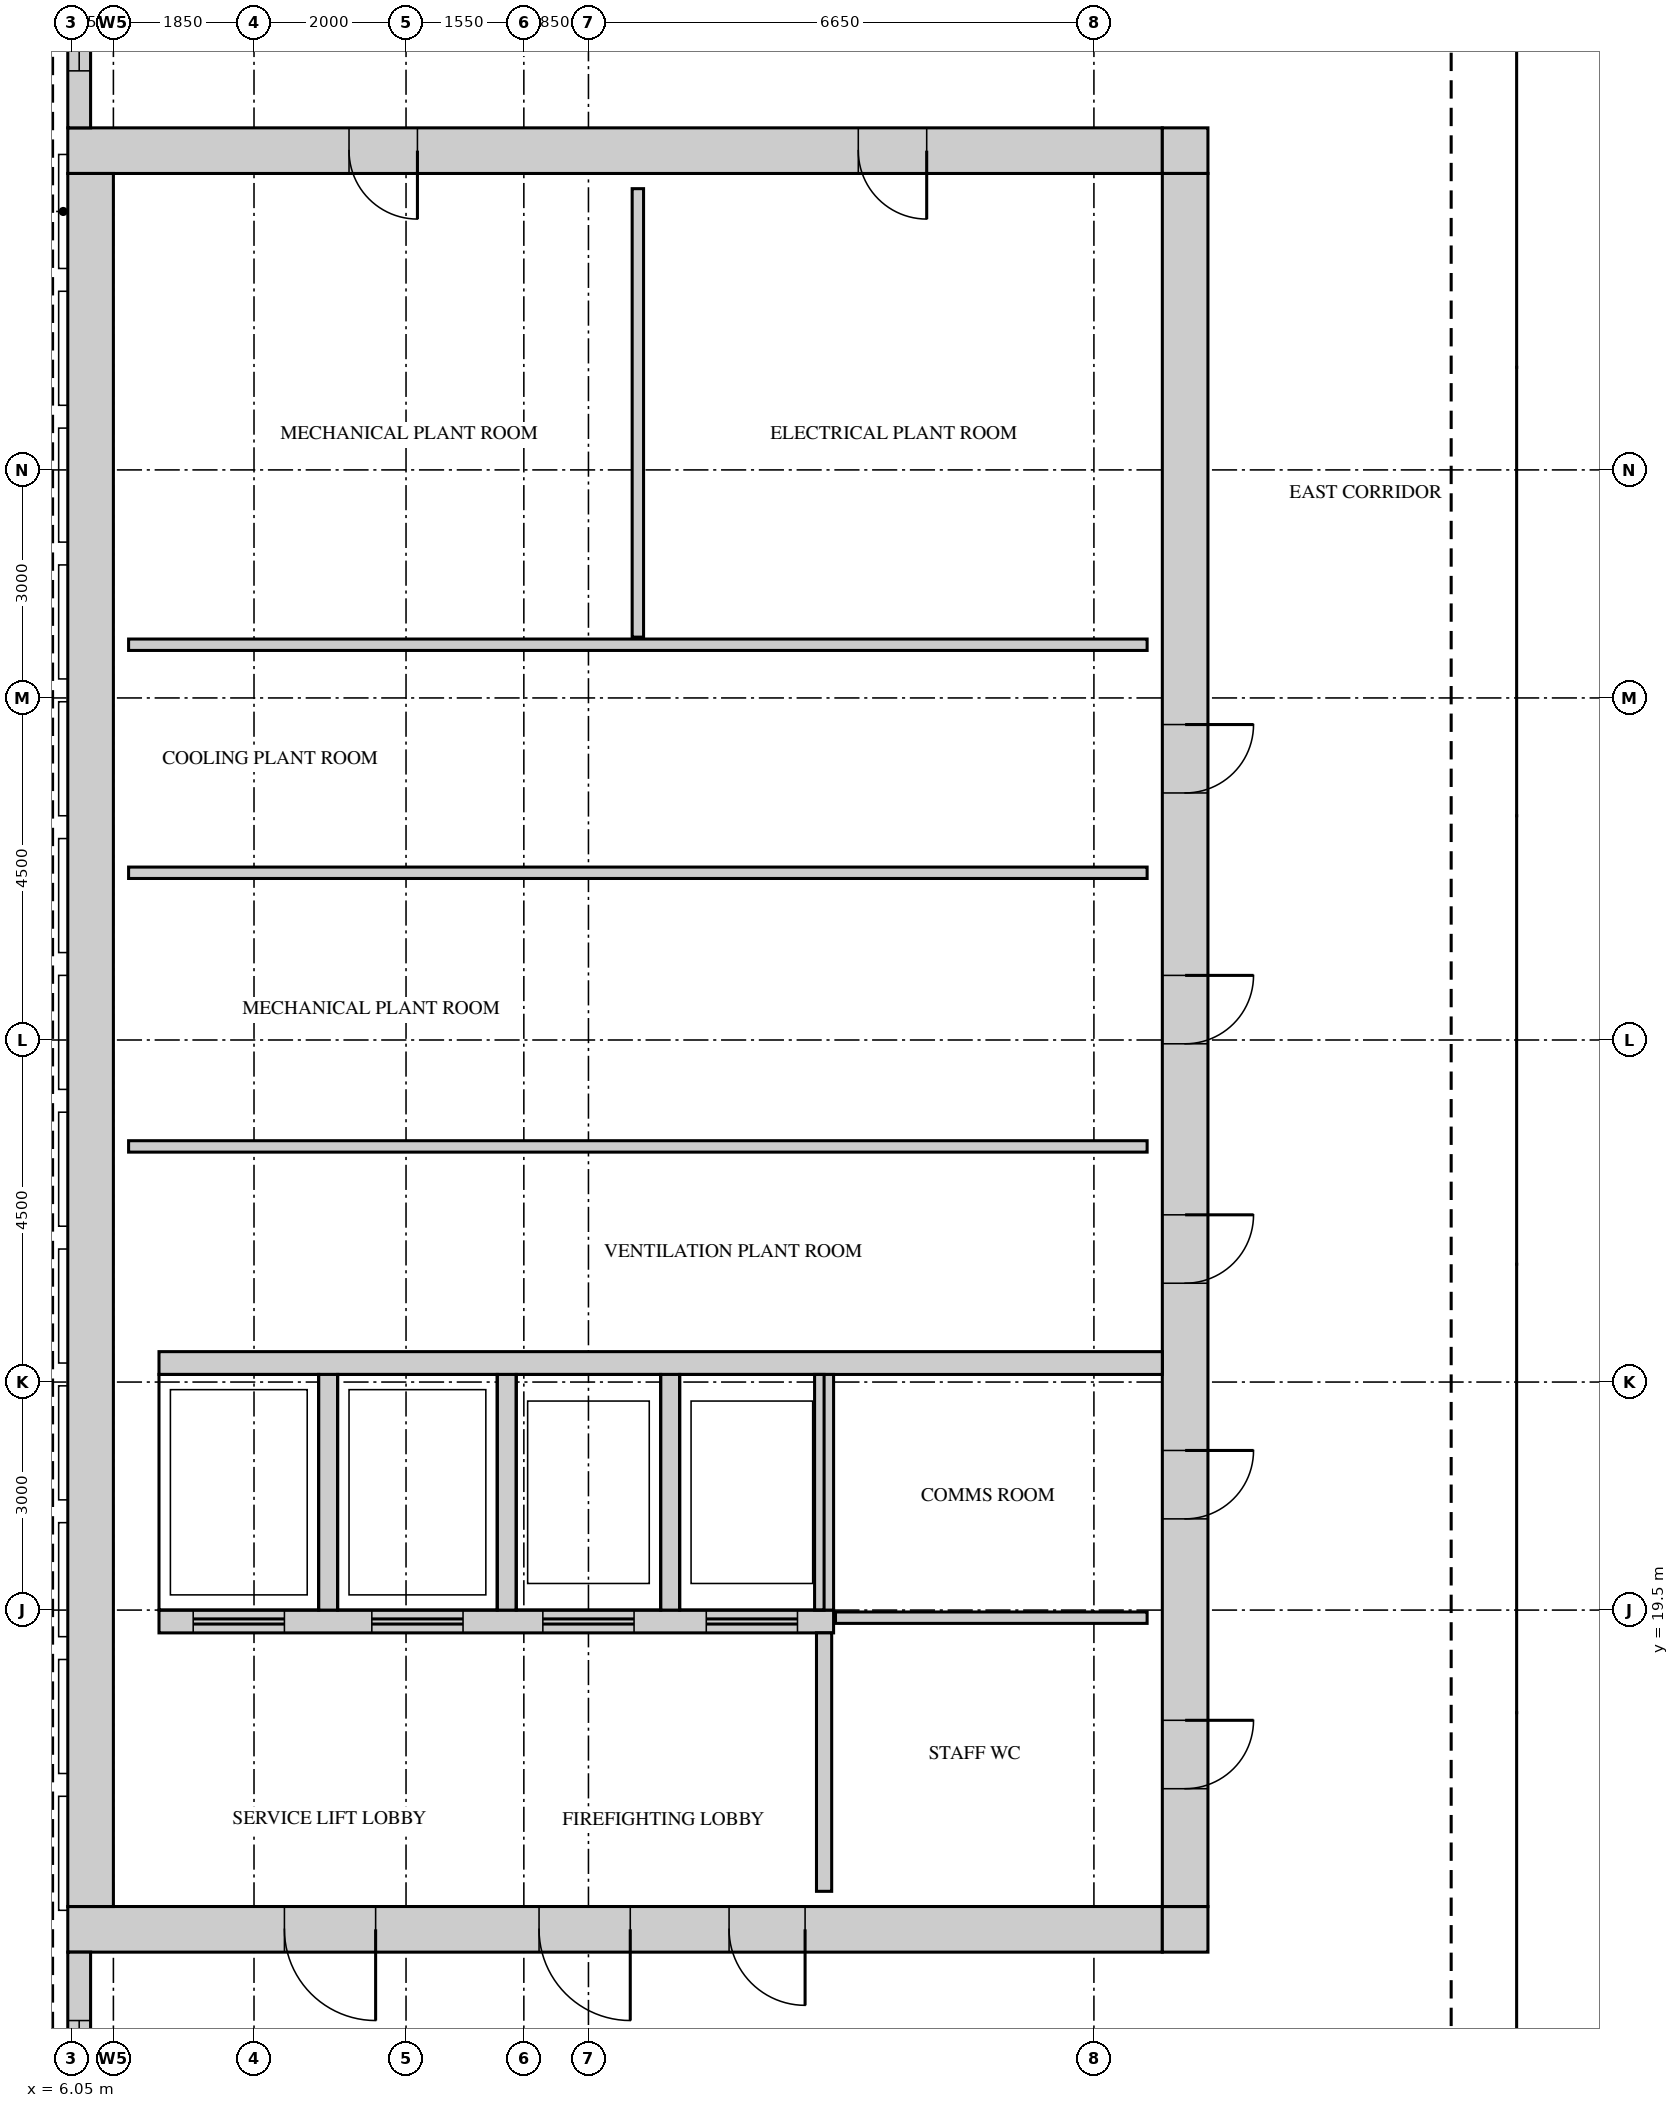
"""IFC4 building model, lengths in metres.
Left out: names, types, materials, properties, quantities, classifications, styles, units other than length and angle.
Written with IfcOpenShell. Run it as: python <this file> out.ifc"""

import sys

from ifc_helpers import new_model, si_unit, direction, frame, frame_2d, origin, place, context, subcontext, project, spatial, rectangle, extrude, source, transform, mapped, element, fill, save


model = new_model("IFC4")
c1 = context("Model", 3, precision=1e-05, world=origin(), true_north=direction((0.0, 1.0)))
c2 = subcontext(c1, "Body", "Model", "MODEL_VIEW")
j1 = project(units=[si_unit("LENGTHUNIT", "METRE"), si_unit("PLANEANGLEUNIT", "RADIAN")], contexts=[c1])
p1 = place(None, origin())
s1 = spatial("IfcSite", under=j1, at=p1, CompositionType="ELEMENT")
p2 = place(p1, origin())
s2 = spatial("IfcBuilding", under=s1, at=p2, CompositionType="ELEMENT")
p3 = place(p2, frame((0.0, 0.0, 352.7)))
s3 = spatial("IfcBuildingStorey", under=s2, at=p3, CompositionType="ELEMENT", Elevation=352.7)
m1 = source(origin(), c2, "Body", "SweptSolid", [
    extrude(rectangle(XDim=14.4, YDim=0.6, at=frame_2d((7.2, 0.0))), origin(), (0.0, 0.0, 1.0), 4.5),
])
p4 = place(p3, frame((6.0, 38.7, 0.0), z_axis=(0.0, 0.0, 1.0), x_axis=(1.0, 0.0, 0.0)))
e1 = element("IfcWall", 1, at=p4, inside=s3, PredefinedType="SHEAR", context=c2, shape_type="MappedRepresentation", body=[
    mapped(m1, transform((0.0, 0.0, 0.0))),
])
m2 = source(origin(), c2, "Body", "SweptSolid", [
    extrude(rectangle(XDim=0.9, YDim=2.1, at=frame_2d((0.45, 1.05))), frame((0.0, 0.31, 0.0), z_axis=(0.0, -1.0, 0.0), x_axis=(1.0, 0.0, 0.0)), (0.0, 0.0, 1.0), 0.62),
])
p5 = place(p4, frame((3.7, 0.0, 0.0)))
e2 = element("IfcOpeningElement", 2, at=p5, cuts=e1, PredefinedType="OPENING", context=c2, shape_type="MappedRepresentation", body=[
    mapped(m2, transform((0.0, 0.0, 0.0))),
])
p6 = place(p4, frame((10.4, 0.0, 0.0)))
e3 = element("IfcOpeningElement", 3, at=p6, cuts=e1, PredefinedType="OPENING", context=c2, shape_type="MappedRepresentation", body=[
    mapped(m2, transform((0.0, 0.0, 0.0))),
])
m3 = source(origin(), c2, "Body", "SweptSolid", [
    extrude(rectangle(XDim=0.6, YDim=0.6, at=frame_2d((0.3, 0.0))), origin(), (0.0, 0.0, 1.0), 4.5),
])
p7 = place(p3, frame((20.4, 38.7, 0.0), z_axis=(0.0, 0.0, 1.0), x_axis=(1.0, 0.0, 0.0)))
e4 = element("IfcWall", 4, at=p7, inside=s3, PredefinedType="SHEAR", context=c2, shape_type="MappedRepresentation", body=[
    mapped(m3, transform((0.0, 0.0, 0.0))),
])
p8 = place(p3, frame((6.0, 15.3, 0.0), z_axis=(0.0, 0.0, 1.0), x_axis=(1.0, 0.0, 0.0)))
e5 = element("IfcWall", 5, at=p8, inside=s3, PredefinedType="SHEAR", context=c2, shape_type="MappedRepresentation", body=[
    mapped(m1, transform((0.0, 0.0, 0.0))),
])
m4 = source(origin(), c2, "Body", "SweptSolid", [
    extrude(rectangle(XDim=1.2, YDim=2.1, at=frame_2d((0.6, 1.05))), frame((0.0, 0.31, 0.0), z_axis=(0.0, -1.0, 0.0), x_axis=(1.0, 0.0, 0.0)), (0.0, 0.0, 1.0), 0.62),
])
p9 = place(p8, frame((6.2, 0.0, 0.0)))
e6 = element("IfcOpeningElement", 6, at=p9, cuts=e5, PredefinedType="OPENING", context=c2, shape_type="MappedRepresentation", body=[
    mapped(m4, transform((0.0, 0.0, 0.0))),
])
p10 = place(p8, frame((2.85, 0.0, 0.0)))
e7 = element("IfcOpeningElement", 7, at=p10, cuts=e5, PredefinedType="OPENING", context=c2, shape_type="MappedRepresentation", body=[
    mapped(m4, transform((0.0, 0.0, 0.0))),
])
m5 = source(origin(), c2, "Body", "SweptSolid", [
    extrude(rectangle(XDim=1.0, YDim=2.1, at=frame_2d((0.5, 1.05))), frame((0.0, 0.31, 0.0), z_axis=(0.0, -1.0, 0.0), x_axis=(1.0, 0.0, 0.0)), (0.0, 0.0, 1.0), 0.62),
])
p11 = place(p8, frame((8.7, 0.0, 0.0)))
e8 = element("IfcOpeningElement", 8, at=p11, cuts=e5, PredefinedType="OPENING", context=c2, shape_type="MappedRepresentation", body=[
    mapped(m5, transform((0.0, 0.0, 0.0))),
])
p12 = place(p3, frame((20.4, 15.3, 0.0), z_axis=(0.0, 0.0, 1.0), x_axis=(1.0, 0.0, 0.0)))
e9 = element("IfcWall", 9, at=p12, inside=s3, PredefinedType="SHEAR", context=c2, shape_type="MappedRepresentation", body=[
    mapped(m3, transform((0.0, 0.0, 0.0))),
])
m6 = source(origin(), c2, "Body", "SweptSolid", [
    extrude(rectangle(XDim=22.8, YDim=0.6, at=frame_2d((11.4, 0.0))), origin(), (0.0, 0.0, 1.0), 4.5),
])
p13 = place(p3, frame((20.7, 15.6, 0.0), z_axis=(0.0, 0.0, 1.0), x_axis=(0.0, 1.0, 0.0)))
e10 = element("IfcWall", 10, at=p13, inside=s3, PredefinedType="SHEAR", context=c2, shape_type="MappedRepresentation", body=[
    mapped(m6, transform((0.0, 0.0, 0.0))),
])
p14 = place(p13, frame((8.2, 0.0, 0.0)))
e11 = element("IfcOpeningElement", 11, at=p14, cuts=e10, PredefinedType="OPENING", context=c2, shape_type="MappedRepresentation", body=[
    mapped(m2, transform((0.0, 0.0, 0.0))),
])
p15 = place(p13, frame((11.35, 0.0, 0.0)))
e12 = element("IfcOpeningElement", 12, at=p15, cuts=e10, PredefinedType="OPENING", context=c2, shape_type="MappedRepresentation", body=[
    mapped(m2, transform((0.0, 0.0, 0.0))),
])
p16 = place(p13, frame((14.65, 0.0, 0.0)))
e13 = element("IfcOpeningElement", 13, at=p16, cuts=e10, PredefinedType="OPENING", context=c2, shape_type="MappedRepresentation", body=[
    mapped(m2, transform((0.0, 0.0, 0.0))),
])
p17 = place(p13, frame((1.55, 0.0, 0.0)))
e14 = element("IfcOpeningElement", 14, at=p17, cuts=e10, PredefinedType="OPENING", context=c2, shape_type="MappedRepresentation", body=[
    mapped(m2, transform((0.0, 0.0, 0.0))),
])
p18 = place(p13, frame((5.1, 0.0, 0.0)))
e15 = element("IfcOpeningElement", 15, at=p18, cuts=e10, PredefinedType="OPENING", context=c2, shape_type="MappedRepresentation", body=[
    mapped(m2, transform((0.0, 0.0, 0.0))),
])
p19 = place(p3, frame((6.3, 15.6, 0.0), z_axis=(0.0, 0.0, 1.0), x_axis=(0.0, 1.0, 0.0)))
e16 = element("IfcWall", 16, at=p19, inside=s3, PredefinedType="SHEAR", context=c2, shape_type="MappedRepresentation", body=[
    mapped(m6, transform((0.0, 0.0, 0.0))),
])
m7 = source(origin(), c2, "Body", "SweptSolid", [
    extrude(rectangle(XDim=13.2, YDim=0.3, at=frame_2d((6.6, 0.0))), origin(), (0.0, 0.0, 1.0), 4.5),
])
p20 = place(p3, frame((7.2, 22.75, 0.0), z_axis=(0.0, 0.0, 1.0), x_axis=(1.0, 0.0, 0.0)))
e17 = element("IfcWall", 17, at=p20, inside=s3, PredefinedType="STANDARD", context=c2, shape_type="MappedRepresentation", body=[
    mapped(m7, transform((0.0, 0.0, 0.0))),
])
m8 = source(origin(), c2, "Body", "SweptSolid", [
    extrude(rectangle(XDim=8.875, YDim=0.3, at=frame_2d((4.438, 0.0))), origin(), (0.0, 0.0, 1.0), 4.5),
])
p21 = place(p3, frame((7.2, 19.35, 0.0), z_axis=(0.0, 0.0, 1.0), x_axis=(1.0, 0.0, 0.0)))
e18 = element("IfcWall", 18, at=p21, inside=s3, PredefinedType="STANDARD", context=c2, shape_type="MappedRepresentation", body=[
    mapped(m8, transform((0.0, 0.0, 0.0))),
])
m9 = source(origin(), c2, "Body", "SweptSolid", [
    extrude(rectangle(XDim=1.2, YDim=2.1, at=frame_2d((0.6, 1.05))), frame((0.0, 0.16, 0.0), z_axis=(0.0, -1.0, 0.0), x_axis=(1.0, 0.0, 0.0)), (0.0, 0.0, 1.0), 0.32),
])
p22 = place(p21, frame((0.45, 0.0, 0.0)))
e19 = element("IfcOpeningElement", 19, at=p22, cuts=e18, PredefinedType="OPENING", context=c2, shape_type="MappedRepresentation", body=[
    mapped(m9, transform((0.0, 0.0, 0.0))),
])
p23 = place(p21, frame((2.8, 0.0, 0.0)))
e20 = element("IfcOpeningElement", 20, at=p23, cuts=e18, PredefinedType="OPENING", context=c2, shape_type="MappedRepresentation", body=[
    mapped(m9, transform((0.0, 0.0, 0.0))),
])
p24 = place(p21, frame((5.05, 0.0, 0.0)))
e21 = element("IfcOpeningElement", 21, at=p24, cuts=e18, PredefinedType="OPENING", context=c2, shape_type="MappedRepresentation", body=[
    mapped(m9, transform((0.0, 0.0, 0.0))),
])
p25 = place(p21, frame((7.2, 0.0, 0.0)))
e22 = element("IfcOpeningElement", 22, at=p25, cuts=e18, PredefinedType="OPENING", context=c2, shape_type="MappedRepresentation", body=[
    mapped(m9, transform((0.0, 0.0, 0.0))),
])
m10 = source(origin(), c2, "Body", "SweptSolid", [
    extrude(rectangle(XDim=3.1, YDim=0.25, at=frame_2d((1.55, 0.0))), origin(), (0.0, 0.0, 1.0), 4.5),
])
for number, where, z_axis, x_axis in (
    (23, (9.425, 19.5, 0.0), (0.0, 0.0, 1.0), (0.0, 1.0, 0.0)),
    (24, (11.775, 19.5, 0.0), (0.0, 0.0, 1.0), (0.0, 1.0, 0.0)),
    (25, (13.925, 19.5, 0.0), (0.0, 0.0, 1.0), (0.0, 1.0, 0.0)),
    (26, (15.95, 19.5, 0.0), (0.0, 0.0, 1.0), (0.0, 1.0, 0.0)),
):
    element("IfcWall", number, at=place(p3, frame(where, z_axis=z_axis, x_axis=x_axis)), inside=s3, PredefinedType="STANDARD", context=c2, shape_type="MappedRepresentation", body=[
        mapped(m10, transform((0.0, 0.0, 0.0))),
    ])
m11 = source(origin(), c2, "Body", "SweptSolid", [
    extrude(rectangle(XDim=2.7, YDim=0.3, at=frame_2d((1.35, 0.0))), origin(), (0.0, 0.0, 1.0), 4.5),
])
p26 = place(p3, frame((6.15, 41.7, 0.0), z_axis=(0.0, 0.0, 1.0), x_axis=(0.0, -1.0, 0.0)))
e27 = element("IfcWall", 27, at=p26, inside=s3, PredefinedType="SOLIDWALL", context=c2, shape_type="MappedRepresentation", body=[
    mapped(m11, transform((0.0, 0.0, 0.0))),
])
m12 = source(origin(), c2, "Body", "SweptSolid", [
    extrude(rectangle(XDim=1.2, YDim=2.4, at=frame_2d((0.6, 1.2))), frame((0.0, 0.16, 0.0), z_axis=(0.0, -1.0, 0.0), x_axis=(1.0, 0.0, 0.0)), (0.0, 0.0, 1.0), 0.32),
])
p27 = place(p26, frame((0.75, 0.0, 0.9)))
e28 = element("IfcOpeningElement", 28, at=p27, cuts=e27, PredefinedType="OPENING", context=c2, shape_type="MappedRepresentation", body=[
    mapped(m12, transform((0.0, 0.0, 0.0))),
])
m13 = source(origin(), c2, "Body", "SweptSolid", [
    extrude(rectangle(XDim=3.0, YDim=0.3, at=frame_2d((1.5, 0.0))), origin(), (0.0, 0.0, 1.0), 4.5),
])
p28 = place(p3, frame((6.15, 15.0, 0.0), z_axis=(0.0, 0.0, 1.0), x_axis=(0.0, -1.0, 0.0)))
e29 = element("IfcWall", 29, at=p28, inside=s3, PredefinedType="SOLIDWALL", context=c2, shape_type="MappedRepresentation", body=[
    mapped(m13, transform((0.0, 0.0, 0.0))),
])
p29 = place(p28, frame((0.9, 0.0, 0.9)))
e30 = element("IfcOpeningElement", 30, at=p29, cuts=e29, PredefinedType="OPENING", context=c2, shape_type="MappedRepresentation", body=[
    mapped(m12, transform((0.0, 0.0, 0.0))),
])
m14 = source(origin(), c2, "Body", "SweptSolid", [
    extrude(rectangle(XDim=3.4, YDim=0.2, at=frame_2d((1.7, 0.0))), origin(), (0.0, 0.0, 1.0), 4.5),
])
p30 = place(p3, frame((15.95, 15.8, 0.0), z_axis=(0.0, 0.0, 1.0), x_axis=(0.0, 1.0, 0.0)))
e31 = element("IfcWall", 31, at=p30, inside=s3, PredefinedType="PARTITIONING", context=c2, shape_type="MappedRepresentation", body=[
    mapped(m14, transform((0.0, 0.0, 0.0))),
])
m15 = source(origin(), c2, "Body", "SweptSolid", [
    extrude(rectangle(XDim=4.1, YDim=0.15, at=frame_2d((2.05, 0.0))), origin(), (0.0, 0.0, 1.0), 4.5),
])
p31 = place(p3, frame((16.1, 19.4, 0.0), z_axis=(0.0, 0.0, 1.0), x_axis=(1.0, 0.0, 0.0)))
e32 = element("IfcWall", 32, at=p31, inside=s3, PredefinedType="PARTITIONING", context=c2, shape_type="MappedRepresentation", body=[
    mapped(m15, transform((0.0, 0.0, 0.0))),
])
m16 = source(origin(), c2, "Body", "SweptSolid", [
    extrude(rectangle(XDim=13.4, YDim=0.15, at=frame_2d((6.7, 0.0))), origin(), (0.0, 0.0, 1.0), 4.5),
])
for number, where, z_axis, x_axis in (
    (33, (6.8, 25.6, 0.0), (0.0, 0.0, 1.0), (1.0, 0.0, 0.0)),
    (34, (6.8, 29.2, 0.0), (0.0, 0.0, 1.0), (1.0, 0.0, 0.0)),
    (35, (6.8, 32.2, 0.0), (0.0, 0.0, 1.0), (1.0, 0.0, 0.0)),
):
    element("IfcWall", number, at=place(p3, frame(where, z_axis=z_axis, x_axis=x_axis)), inside=s3, PredefinedType="PARTITIONING", context=c2, shape_type="MappedRepresentation", body=[
        mapped(m16, transform((0.0, 0.0, 0.0))),
    ])
m17 = source(origin(), c2, "Body", "SweptSolid", [
    extrude(rectangle(XDim=5.9, YDim=0.15, at=frame_2d((2.95, 0.0))), origin(), (0.0, 0.0, 1.0), 4.5),
])
p32 = place(p3, frame((13.5, 32.3, 0.0), z_axis=(0.0, 0.0, 1.0), x_axis=(0.0, 1.0, 0.0)))
e36 = element("IfcWall", 36, at=p32, inside=s3, PredefinedType="PARTITIONING", context=c2, shape_type="MappedRepresentation", body=[
    mapped(m17, transform((0.0, 0.0, 0.0))),
])
m18 = source(origin(), c2, "Body", "SweptSolid", [
    extrude(rectangle(XDim=1.2, YDim=2.4, at=frame_2d((0.6, 1.2))), frame((0.0, 0.03, 0.0), z_axis=(0.0, -1.0, 0.0), x_axis=(1.0, 0.0, 0.0)), (0.0, 0.0, 1.0), 0.06),
])
p33 = place(p27, origin())
e37 = element("IfcWindow", 37, at=p33, inside=s3, PartitioningType="SINGLE_PANEL", PredefinedType="WINDOW", context=c2, shape_type="MappedRepresentation", body=[
    mapped(m18, transform((0.0, 0.0, 0.0))),
])
fill(e28, e37)
p34 = place(p29, origin())
e38 = element("IfcWindow", 38, at=p34, inside=s3, PartitioningType="SINGLE_PANEL", PredefinedType="WINDOW", context=c2, shape_type="MappedRepresentation", body=[
    mapped(m18, transform((0.0, 0.0, 0.0))),
])
fill(e30, e38)
m19 = source(origin(), c2, "Body", "SweptSolid", [
    extrude(rectangle(XDim=0.9, YDim=2.1, at=frame_2d((0.45, 1.05))), frame((0.0, 0.25, 0.0), z_axis=(0.0, -1.0, 0.0), x_axis=(1.0, 0.0, 0.0)), (0.0, 0.0, 1.0), 0.5),
])
p35 = place(p14, origin())
e39 = element("IfcDoor", 39, at=p35, inside=s3, OperationType="SINGLE_SWING_RIGHT", PredefinedType="DOOR", context=c2, shape_type="MappedRepresentation", body=[
    mapped(m19, transform((0.0, 0.0, 0.0))),
])
fill(e11, e39)
p36 = place(p15, origin())
e40 = element("IfcDoor", 40, at=p36, inside=s3, OperationType="SINGLE_SWING_RIGHT", PredefinedType="DOOR", context=c2, shape_type="MappedRepresentation", body=[
    mapped(m19, transform((0.0, 0.0, 0.0))),
])
fill(e12, e40)
p37 = place(p16, origin())
e41 = element("IfcDoor", 41, at=p37, inside=s3, OperationType="SINGLE_SWING_RIGHT", PredefinedType="DOOR", context=c2, shape_type="MappedRepresentation", body=[
    mapped(m19, transform((0.0, 0.0, 0.0))),
])
fill(e13, e41)
p38 = place(p5, origin())
e42 = element("IfcDoor", 42, at=p38, inside=s3, OperationType="SINGLE_SWING_RIGHT", PredefinedType="DOOR", context=c2, shape_type="MappedRepresentation", body=[
    mapped(m19, transform((0.0, 0.0, 0.0))),
])
fill(e2, e42)
p39 = place(p6, origin())
e43 = element("IfcDoor", 43, at=p39, inside=s3, OperationType="SINGLE_SWING_RIGHT", PredefinedType="DOOR", context=c2, shape_type="MappedRepresentation", body=[
    mapped(m19, transform((0.0, 0.0, 0.0))),
])
fill(e3, e43)
p40 = place(p17, origin())
e44 = element("IfcDoor", 44, at=p40, inside=s3, OperationType="SINGLE_SWING_RIGHT", PredefinedType="DOOR", context=c2, shape_type="MappedRepresentation", body=[
    mapped(m19, transform((0.0, 0.0, 0.0))),
])
fill(e14, e44)
p41 = place(p18, origin())
e45 = element("IfcDoor", 45, at=p41, inside=s3, OperationType="SINGLE_SWING_RIGHT", PredefinedType="DOOR", context=c2, shape_type="MappedRepresentation", body=[
    mapped(m19, transform((0.0, 0.0, 0.0))),
])
fill(e15, e45)
m20 = source(origin(), c2, "Body", "SweptSolid", [
    extrude(rectangle(XDim=1.2, YDim=2.1, at=frame_2d((0.6, 1.05))), frame((0.0, 0.25, 0.0), z_axis=(0.0, -1.0, 0.0), x_axis=(1.0, 0.0, 0.0)), (0.0, 0.0, 1.0), 0.5),
])
p42 = place(p9, origin())
e46 = element("IfcDoor", 46, at=p42, inside=s3, OperationType="SINGLE_SWING_RIGHT", PredefinedType="DOOR", context=c2, shape_type="MappedRepresentation", body=[
    mapped(m20, transform((0.0, 0.0, 0.0))),
])
fill(e6, e46)
p43 = place(p10, origin())
e47 = element("IfcDoor", 47, at=p43, inside=s3, OperationType="SINGLE_SWING_RIGHT", PredefinedType="DOOR", context=c2, shape_type="MappedRepresentation", body=[
    mapped(m20, transform((0.0, 0.0, 0.0))),
])
fill(e7, e47)
m21 = source(origin(), c2, "Body", "SweptSolid", [
    extrude(rectangle(XDim=1.0, YDim=2.1, at=frame_2d((0.5, 1.05))), frame((0.0, 0.25, 0.0), z_axis=(0.0, -1.0, 0.0), x_axis=(1.0, 0.0, 0.0)), (0.0, 0.0, 1.0), 0.5),
])
p44 = place(p11, origin())
e48 = element("IfcDoor", 48, at=p44, inside=s3, OperationType="SINGLE_SWING_RIGHT", PredefinedType="DOOR", context=c2, shape_type="MappedRepresentation", body=[
    mapped(m21, transform((0.0, 0.0, 0.0))),
])
fill(e8, e48)
m22 = source(origin(), c2, "Body", "SweptSolid", [
    extrude(rectangle(XDim=1.2, YDim=2.1, at=frame_2d((0.6, 1.05))), frame((0.0, 0.025, 0.0), z_axis=(0.0, -1.0, 0.0), x_axis=(1.0, 0.0, 0.0)), (0.0, 0.0, 1.0), 0.05),
])
p45 = place(p22, origin())
e49 = element("IfcDoor", 49, at=p45, inside=s3, OperationType="DOUBLE_DOOR_SLIDING", PredefinedType="DOOR", context=c2, shape_type="MappedRepresentation", body=[
    mapped(m22, transform((0.0, 0.0, 0.0))),
])
fill(e19, e49)
p46 = place(p23, origin())
e50 = element("IfcDoor", 50, at=p46, inside=s3, OperationType="DOUBLE_DOOR_SLIDING", PredefinedType="DOOR", context=c2, shape_type="MappedRepresentation", body=[
    mapped(m22, transform((0.0, 0.0, 0.0))),
])
fill(e20, e50)
p47 = place(p24, origin())
e51 = element("IfcDoor", 51, at=p47, inside=s3, OperationType="DOUBLE_DOOR_SLIDING", PredefinedType="DOOR", context=c2, shape_type="MappedRepresentation", body=[
    mapped(m22, transform((0.0, 0.0, 0.0))),
])
fill(e21, e51)
p48 = place(p25, origin())
e52 = element("IfcDoor", 52, at=p48, inside=s3, OperationType="DOUBLE_DOOR_SLIDING", PredefinedType="DOOR", context=c2, shape_type="MappedRepresentation", body=[
    mapped(m22, transform((0.0, 0.0, 0.0))),
])
fill(e22, e52)
save(model, sys.argv[1])
